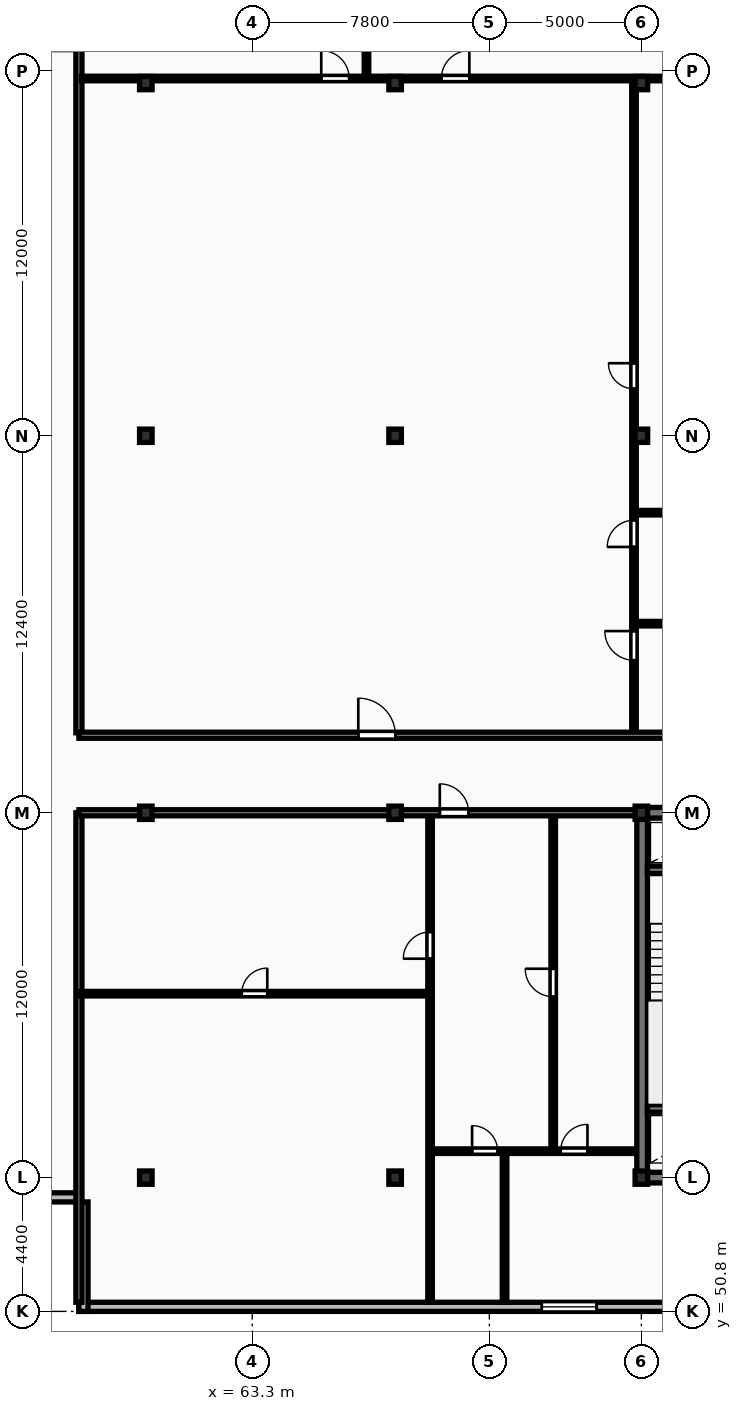
"""IFC4 building model, lengths in metres.
Left out: names, types, materials, properties, quantities, classifications, styles, units other than length and angle.
Written with IfcOpenShell. Run it as: python <this file> out.ifc"""

import sys

from ifc_helpers import new_model, si_unit, direction, frame, frame_2d, origin, origin_2d, place, context, subcontext, project, spatial, rectangle, i_section, extrude, element, fill, save


model = new_model("IFC4")
c1 = context("Model", 3, precision=1e-05, world=origin(), true_north=direction((0.0, 1.0)))
c2 = subcontext(c1, "Body", "Model", "MODEL_VIEW")
j1 = project(units=[si_unit("LENGTHUNIT", "METRE"), si_unit("PLANEANGLEUNIT", "RADIAN")], contexts=[c1])
p1 = place(None, origin())
s1 = spatial("IfcSite", under=j1, at=p1, CompositionType="ELEMENT")
p2 = place(p1, origin())
s2 = spatial("IfcBuilding", under=s1, at=p2, CompositionType="ELEMENT")
p3 = place(p2, frame((0.0, 0.0, 150.1)))
s3 = spatial("IfcBuildingStorey", under=s2, at=p3, CompositionType="ELEMENT", Elevation=150.1)
for number, where, z_axis, x_axis in (
    (1, (59.8, 55.2, 0.0), (0.0, 0.0, 1.0), (1.0, 0.0, 0.0)),
    (2, (59.8, 67.2, 0.0), (0.0, 0.0, 1.0), (1.0, 0.0, 0.0)),
    (3, (59.8, 79.6, 0.0), (0.0, 0.0, 1.0), (1.0, 0.0, 0.0)),
    (4, (59.8, 91.2, 0.0), (0.0, 0.0, 1.0), (1.0, 0.0, 0.0)),
    (5, (68.0, 55.2, 0.0), (0.0, 0.0, 1.0), (1.0, 0.0, 0.0)),
    (6, (68.0, 67.2, 0.0), (0.0, 0.0, 1.0), (1.0, 0.0, 0.0)),
    (7, (68.0, 79.6, 0.0), (0.0, 0.0, 1.0), (1.0, 0.0, 0.0)),
    (8, (68.0, 91.2, 0.0), (0.0, 0.0, 1.0), (1.0, 0.0, 0.0)),
    (9, (76.1, 55.2, 0.0), (0.0, 0.0, 1.0), (1.0, 0.0, 0.0)),
    (10, (76.1, 67.2, 0.0), (0.0, 0.0, 1.0), (1.0, 0.0, 0.0)),
    (11, (76.1, 79.6, 0.0), (0.0, 0.0, 1.0), (1.0, 0.0, 0.0)),
    (12, (76.1, 91.2, 0.0), (0.0, 0.0, 1.0), (1.0, 0.0, 0.0)),
):
    element("IfcColumn", number, at=place(p3, frame(where, z_axis=z_axis, x_axis=x_axis)), inside=s3, PredefinedType="COLUMN", context=c2, shape_type="SweptSolid", body=[
        extrude(i_section(OverallWidth=0.412, OverallDepth=0.437, WebThickness=0.036, FlangeThickness=0.052, FilletRadius=0.015, at=origin_2d()), origin(), (0.0, 0.0, 1.0), 3.6),
    ])
p4 = place(p3, frame((57.6, 50.95, 0.0), z_axis=(0.0, 0.0, 1.0), x_axis=(1.0, 0.0, 0.0)))
e13 = element("IfcWall", 13, at=p4, inside=s3, PredefinedType="STANDARD", context=c2, shape_type="SweptSolid", body=[
    extrude(rectangle(XDim=73.0, YDim=0.3, at=frame_2d((36.5, 0.0))), origin(), (0.0, 0.0, 1.0), 3.31),
])
p5 = place(p4, frame((15.225, 0.0, 0.85)))
e14 = element("IfcOpeningElement", 14, at=p5, cuts=e13, PredefinedType="OPENING", context=c2, shape_type="SweptSolid", body=[
    extrude(rectangle(XDim=1.8, YDim=1.8, at=frame_2d((0.9, 0.9))), frame((0.0, 0.16, 0.0), z_axis=(0.0, -1.0, 0.0), x_axis=(1.0, 0.0, 0.0)), (0.0, 0.0, 1.0), 0.32),
])
p6 = place(p4, frame((58.575, 0.0, 0.85)))
e15 = element("IfcOpeningElement", 15, at=p6, cuts=e13, PredefinedType="OPENING", context=c2, shape_type="SweptSolid", body=[
    extrude(rectangle(XDim=1.8, YDim=1.8, at=frame_2d((0.9, 0.9))), frame((0.0, 0.16, 0.0), z_axis=(0.0, -1.0, 0.0), x_axis=(1.0, 0.0, 0.0)), (0.0, 0.0, 1.0), 0.32),
])
p7 = place(p4, frame((33.45, 0.0, 0.0)))
e16 = element("IfcOpeningElement", 16, at=p7, cuts=e13, PredefinedType="OPENING", context=c2, shape_type="SweptSolid", body=[
    extrude(rectangle(XDim=1.1, YDim=2.1, at=frame_2d((0.55, 1.05))), frame((0.0, 0.16, 0.0), z_axis=(0.0, -1.0, 0.0), x_axis=(1.0, 0.0, 0.0)), (0.0, 0.0, 1.0), 0.32),
])
p8 = place(p3, frame((54.0, 54.55, 0.0), z_axis=(0.0, 0.0, 1.0), x_axis=(1.0, 0.0, 0.0)))
e17 = element("IfcWall", 17, at=p8, inside=s3, PredefinedType="STANDARD", context=c2, shape_type="SweptSolid", body=[
    extrude(rectangle(XDim=3.6, YDim=0.3, at=frame_2d((1.8, 0.0))), origin(), (0.0, 0.0, 1.0), 3.31),
])
p9 = place(p3, frame((57.75, 54.4, 0.0), z_axis=(0.0, 0.0, 1.0), x_axis=(0.0, -1.0, 0.0)))
e18 = element("IfcWall", 18, at=p9, inside=s3, PredefinedType="STANDARD", context=c2, shape_type="SweptSolid", body=[
    extrude(rectangle(XDim=3.6, YDim=0.3, at=frame_2d((1.8, 0.0))), origin(), (0.0, 0.0, 1.0), 3.31),
])
p10 = place(p3, frame((75.95, 55.2, 0.0), z_axis=(0.0, 0.0, 1.0), x_axis=(1.0, 0.0, 0.0)))
e19 = element("IfcWall", 19, at=p10, inside=s3, PredefinedType="SHEAR", context=c2, shape_type="SweptSolid", body=[
    extrude(rectangle(XDim=36.3, YDim=0.35, at=frame_2d((18.15, 0.0))), origin(), (0.0, 0.0, 1.0), 3.6),
])
p11 = place(p10, frame((15.1, 0.0, 0.0)))
e20 = element("IfcOpeningElement", 20, at=p11, cuts=e19, PredefinedType="OPENING", context=c2, shape_type="SweptSolid", body=[
    extrude(rectangle(XDim=1.1, YDim=2.1, at=frame_2d((0.55, 1.05))), frame((0.0, 0.185, 0.0), z_axis=(0.0, -1.0, 0.0), x_axis=(1.0, 0.0, 0.0)), (0.0, 0.0, 1.0), 0.37),
])
p12 = place(p3, frame((76.125, 55.375, 0.0), z_axis=(0.0, 0.0, 1.0), x_axis=(0.0, 1.0, 0.0)))
e21 = element("IfcWall", 21, at=p12, inside=s3, PredefinedType="SHEAR", context=c2, shape_type="SweptSolid", body=[
    extrude(rectangle(XDim=11.65, YDim=0.35, at=frame_2d((5.825, 0.0))), origin(), (0.0, 0.0, 1.0), 3.6),
])
p13 = place(p3, frame((75.95, 67.2, 0.0), z_axis=(0.0, 0.0, 1.0), x_axis=(1.0, 0.0, 0.0)))
e22 = element("IfcWall", 22, at=p13, inside=s3, PredefinedType="SHEAR", context=c2, shape_type="SweptSolid", body=[
    extrude(rectangle(XDim=36.3, YDim=0.35, at=frame_2d((18.15, 0.0))), origin(), (0.0, 0.0, 1.0), 3.6),
])
p14 = place(p13, frame((5.25, 0.0, 0.0)))
e23 = element("IfcOpeningElement", 23, at=p14, cuts=e22, PredefinedType="OPENING", context=c2, shape_type="SweptSolid", body=[
    extrude(rectangle(XDim=1.0, YDim=2.15, at=frame_2d((0.5, 1.075))), frame((0.0, 0.185, 0.0), z_axis=(0.0, -1.0, 0.0), x_axis=(1.0, 0.0, 0.0)), (0.0, 0.0, 1.0), 0.37),
])
p15 = place(p13, frame((21.6, 0.0, 0.0)))
e24 = element("IfcOpeningElement", 24, at=p15, cuts=e22, PredefinedType="OPENING", context=c2, shape_type="SweptSolid", body=[
    extrude(rectangle(XDim=1.5, YDim=2.2, at=frame_2d((0.75, 1.1))), frame((0.0, 0.185, 0.0), z_axis=(0.0, -1.0, 0.0), x_axis=(1.0, 0.0, 0.0)), (0.0, 0.0, 1.0), 0.37),
])
p16 = place(p13, frame((30.45, 0.0, 0.0)))
e25 = element("IfcOpeningElement", 25, at=p16, cuts=e22, PredefinedType="OPENING", context=c2, shape_type="SweptSolid", body=[
    extrude(rectangle(XDim=1.0, YDim=2.15, at=frame_2d((0.5, 1.075))), frame((0.0, 0.185, 0.0), z_axis=(0.0, -1.0, 0.0), x_axis=(1.0, 0.0, 0.0)), (0.0, 0.0, 1.0), 0.37),
])
for number, where, z_axis, x_axis in (
    (26, (76.3, 57.475, 0.0), (0.0, 0.0, 1.0), (1.0, 0.0, 0.0)),
    (27, (76.3, 65.325, 0.0), (0.0, 0.0, 1.0), (1.0, 0.0, 0.0)),
):
    element("IfcWall", number, at=place(p3, frame(where, z_axis=z_axis, x_axis=x_axis)), inside=s3, PredefinedType="SHEAR", context=c2, shape_type="SweptSolid", body=[
        extrude(rectangle(XDim=3.24, YDim=0.25, at=frame_2d((1.62, 0.0))), origin(), (0.0, 0.0, 1.0), 3.6),
    ])
p17 = place(p3, frame((57.6, 51.1, 0.0), z_axis=(0.0, 0.0, 1.0), x_axis=(0.0, 1.0, 0.0)))
e28 = element("IfcWall", 28, at=p17, inside=s3, PredefinedType="PARTITIONING", context=c2, shape_type="SweptSolid", body=[
    extrude(rectangle(XDim=16.1, YDim=0.2, at=frame_2d((8.05, 0.0))), origin(), (0.0, 0.0, 1.0), 3.31),
])
p18 = place(p3, frame((57.6, 61.25, 0.0), z_axis=(0.0, 0.0, 1.0), x_axis=(1.0, 0.0, 0.0)))
e29 = element("IfcWall", 29, at=p18, inside=s3, PredefinedType="PARTITIONING", context=c2, shape_type="SweptSolid", body=[
    extrude(rectangle(XDim=11.55, YDim=0.15, at=frame_2d((5.775, 0.0))), origin(), (0.0, 0.0, 1.0), 3.31),
])
p19 = place(p18, frame((5.355, 0.0, 0.0)))
e30 = element("IfcOpeningElement", 30, at=p19, cuts=e29, PredefinedType="OPENING", context=c2, shape_type="SweptSolid", body=[
    extrude(rectangle(XDim=0.84, YDim=2.04, at=frame_2d((0.42, 1.02))), frame((0.0, 0.085, 0.0), z_axis=(0.0, -1.0, 0.0), x_axis=(1.0, 0.0, 0.0)), (0.0, 0.0, 1.0), 0.17),
])
p20 = place(p3, frame((69.15, 51.1, 0.0), z_axis=(0.0, 0.0, 1.0), x_axis=(0.0, 1.0, 0.0)))
e31 = element("IfcWall", 31, at=p20, inside=s3, PredefinedType="PARTITIONING", context=c2, shape_type="SweptSolid", body=[
    extrude(rectangle(XDim=16.05, YDim=0.15, at=frame_2d((8.025, 0.0))), origin(), (0.0, 0.0, 1.0), 3.31),
])
p21 = place(p20, frame((11.3, 0.0, 0.0)))
e32 = element("IfcOpeningElement", 32, at=p21, cuts=e31, PredefinedType="OPENING", context=c2, shape_type="SweptSolid", body=[
    extrude(rectangle(XDim=0.88, YDim=2.06, at=frame_2d((0.44, 1.03))), frame((0.0, 0.085, 0.0), z_axis=(0.0, -1.0, 0.0), x_axis=(1.0, 0.0, 0.0)), (0.0, 0.0, 1.0), 0.17),
])
p22 = place(p3, frame((73.2, 56.07, 0.0), z_axis=(0.0, 0.0, 1.0), x_axis=(0.0, 1.0, 0.0)))
e33 = element("IfcWall", 33, at=p22, inside=s3, PredefinedType="PARTITIONING", context=c2, shape_type="SweptSolid", body=[
    extrude(rectangle(XDim=11.08, YDim=0.15, at=frame_2d((5.54, 0.0))), origin(), (0.0, 0.0, 1.0), 3.31),
])
p23 = place(p22, frame((5.08, 0.0, 0.0)))
e34 = element("IfcOpeningElement", 34, at=p23, cuts=e33, PredefinedType="OPENING", context=c2, shape_type="SweptSolid", body=[
    extrude(rectangle(XDim=0.92, YDim=2.08, at=frame_2d((0.46, 1.04))), frame((0.0, 0.085, 0.0), z_axis=(0.0, -1.0, 0.0), x_axis=(1.0, 0.0, 0.0)), (0.0, 0.0, 1.0), 0.17),
])
p24 = place(p3, frame((71.6, 51.1, 0.0), z_axis=(0.0, 0.0, 1.0), x_axis=(0.0, 1.0, 0.0)))
e35 = element("IfcWall", 35, at=p24, inside=s3, PredefinedType="PARTITIONING", context=c2, shape_type="SweptSolid", body=[
    extrude(rectangle(XDim=4.97, YDim=0.15, at=frame_2d((2.485, 0.0))), origin(), (0.0, 0.0, 1.0), 3.31),
])
p25 = place(p3, frame((69.17, 56.07, 0.0), z_axis=(0.0, 0.0, 1.0), x_axis=(1.0, 0.0, 0.0)))
e36 = element("IfcWall", 36, at=p25, inside=s3, PredefinedType="PARTITIONING", context=c2, shape_type="SweptSolid", body=[
    extrude(rectangle(XDim=6.76, YDim=0.15, at=frame_2d((3.38, 0.0))), origin(), (0.0, 0.0, 1.0), 3.31),
])
p26 = place(p25, frame((1.362, 0.0, 0.0)))
e37 = element("IfcOpeningElement", 37, at=p26, cuts=e36, PredefinedType="OPENING", context=c2, shape_type="SweptSolid", body=[
    extrude(rectangle(XDim=0.84, YDim=2.04, at=frame_2d((0.42, 1.02))), frame((0.0, 0.085, 0.0), z_axis=(0.0, -1.0, 0.0), x_axis=(1.0, 0.0, 0.0)), (0.0, 0.0, 1.0), 0.17),
])
p27 = place(p25, frame((4.277, 0.0, 0.0)))
e38 = element("IfcOpeningElement", 38, at=p27, cuts=e36, PredefinedType="OPENING", context=c2, shape_type="SweptSolid", body=[
    extrude(rectangle(XDim=0.88, YDim=2.06, at=frame_2d((0.44, 1.03))), frame((0.0, 0.085, 0.0), z_axis=(0.0, -1.0, 0.0), x_axis=(1.0, 0.0, 0.0)), (0.0, 0.0, 1.0), 0.17),
])
p28 = place(p3, frame((57.6, 67.2, 0.0), z_axis=(0.0, 0.0, 1.0), x_axis=(1.0, 0.0, 0.0)))
e39 = element("IfcWall", 39, at=p28, inside=s3, PredefinedType="PARTITIONING", context=c2, shape_type="SweptSolid", body=[
    extrude(rectangle(XDim=18.35, YDim=0.2, at=frame_2d((9.175, 0.0))), origin(), (0.0, 0.0, 1.0), 2.773),
])
p29 = place(p28, frame((11.87, 0.0, 0.0)))
e40 = element("IfcOpeningElement", 40, at=p29, cuts=e39, PredefinedType="OPENING", context=c2, shape_type="SweptSolid", body=[
    extrude(rectangle(XDim=0.95, YDim=2.15, at=frame_2d((0.475, 1.075))), frame((0.0, 0.11, 0.0), z_axis=(0.0, -1.0, 0.0), x_axis=(1.0, 0.0, 0.0)), (0.0, 0.0, 1.0), 0.22),
])
p30 = place(p3, frame((57.6, 69.83, 0.0), z_axis=(0.0, 0.0, 1.0), x_axis=(0.0, 1.0, 0.0)))
e41 = element("IfcWall", 41, at=p30, inside=s3, PredefinedType="PARTITIONING", context=c2, shape_type="SweptSolid", body=[
    extrude(rectangle(XDim=26.07, YDim=0.2, at=frame_2d((13.035, 0.0))), origin(), (0.0, 0.0, 1.0), 3.31),
])
for number, where, z_axis, x_axis in (
    (42, (75.917, 73.42, 0.0), (0.0, 0.0, 1.0), (1.0, 0.0, 0.0)),
    (43, (75.917, 77.07, 0.0), (0.0, 0.0, 1.0), (1.0, 0.0, 0.0)),
):
    element("IfcWall", number, at=place(p3, frame(where, z_axis=z_axis, x_axis=x_axis)), inside=s3, PredefinedType="PARTITIONING", context=c2, shape_type="SweptSolid", body=[
        extrude(rectangle(XDim=3.36, YDim=0.15, at=frame_2d((1.68, 0.0))), origin(), (0.0, 0.0, 1.0), 3.31),
    ])
p31 = place(p3, frame((75.857, 69.81, 0.0), z_axis=(0.0, 0.0, 1.0), x_axis=(0.0, 1.0, 0.0)))
e44 = element("IfcWall", 44, at=p31, inside=s3, PredefinedType="PARTITIONING", context=c2, shape_type="SweptSolid", body=[
    extrude(rectangle(XDim=21.48, YDim=0.15, at=frame_2d((10.74, 0.0))), origin(), (0.0, 0.0, 1.0), 2.617),
])
p32 = place(p31, frame((2.406, 0.0, 0.0)))
e45 = element("IfcOpeningElement", 45, at=p32, cuts=e44, PredefinedType="OPENING", context=c2, shape_type="SweptSolid", body=[
    extrude(rectangle(XDim=0.96, YDim=2.1, at=frame_2d((0.48, 1.05))), frame((0.0, 0.085, 0.0), z_axis=(0.0, -1.0, 0.0), x_axis=(1.0, 0.0, 0.0)), (0.0, 0.0, 1.0), 0.17),
])
p33 = place(p31, frame((6.133, 0.0, 0.0)))
e46 = element("IfcOpeningElement", 46, at=p33, cuts=e44, PredefinedType="OPENING", context=c2, shape_type="SweptSolid", body=[
    extrude(rectangle(XDim=0.88, YDim=2.06, at=frame_2d((0.44, 1.03))), frame((0.0, 0.085, 0.0), z_axis=(0.0, -1.0, 0.0), x_axis=(1.0, 0.0, 0.0)), (0.0, 0.0, 1.0), 0.17),
])
p34 = place(p31, frame((11.336, 0.0, 0.0)))
e47 = element("IfcOpeningElement", 47, at=p34, cuts=e44, PredefinedType="OPENING", context=c2, shape_type="SweptSolid", body=[
    extrude(rectangle(XDim=0.84, YDim=2.04, at=frame_2d((0.42, 1.02))), frame((0.0, 0.085, 0.0), z_axis=(0.0, -1.0, 0.0), x_axis=(1.0, 0.0, 0.0)), (0.0, 0.0, 1.0), 0.17),
])
p35 = place(p3, frame((67.059, 91.43, 0.0), z_axis=(0.0, 0.0, 1.0), x_axis=(0.0, 1.0, 0.0)))
e48 = element("IfcWall", 48, at=p35, inside=s3, PredefinedType="PARTITIONING", context=c2, shape_type="SweptSolid", body=[
    extrude(rectangle(XDim=4.47, YDim=0.15, at=frame_2d((2.235, 0.0))), origin(), (0.0, 0.0, 1.0), 3.31),
])
p36 = place(p3, frame((57.68, 91.35, 0.0), z_axis=(0.0, 0.0, 1.0), x_axis=(1.0, 0.0, 0.0)))
e49 = element("IfcWall", 49, at=p36, inside=s3, PredefinedType="PARTITIONING", context=c2, shape_type="SweptSolid", body=[
    extrude(rectangle(XDim=21.597, YDim=0.15, at=frame_2d((10.799, 0.0))), origin(), (0.0, 0.0, 1.0), 3.003),
])
p37 = place(p36, frame((7.89, 0.0, 0.0)))
e50 = element("IfcOpeningElement", 50, at=p37, cuts=e49, PredefinedType="OPENING", context=c2, shape_type="SweptSolid", body=[
    extrude(rectangle(XDim=0.92, YDim=2.08, at=frame_2d((0.46, 1.04))), frame((0.0, 0.085, 0.0), z_axis=(0.0, -1.0, 0.0), x_axis=(1.0, 0.0, 0.0)), (0.0, 0.0, 1.0), 0.17),
])
p38 = place(p36, frame((11.842, 0.0, 0.0)))
e51 = element("IfcOpeningElement", 51, at=p38, cuts=e49, PredefinedType="OPENING", context=c2, shape_type="SweptSolid", body=[
    extrude(rectangle(XDim=0.92, YDim=2.08, at=frame_2d((0.46, 1.04))), frame((0.0, 0.085, 0.0), z_axis=(0.0, -1.0, 0.0), x_axis=(1.0, 0.0, 0.0)), (0.0, 0.0, 1.0), 0.17),
])
p39 = place(p3, frame((57.6, 69.75, 0.0), z_axis=(0.0, 0.0, 1.0), x_axis=(1.0, 0.0, 0.0)))
e52 = element("IfcWall", 52, at=p39, inside=s3, PredefinedType="PARTITIONING", context=c2, shape_type="SweptSolid", body=[
    extrude(rectangle(XDim=73.0, YDim=0.2, at=frame_2d((36.5, 0.0))), origin(), (0.0, 0.0, 1.0), 3.31),
])
p40 = place(p39, frame((9.189, 0.0, 0.0)))
e53 = element("IfcOpeningElement", 53, at=p40, cuts=e52, PredefinedType="OPENING", context=c2, shape_type="SweptSolid", body=[
    extrude(rectangle(XDim=1.22, YDim=2.18, at=frame_2d((0.61, 1.09))), frame((0.0, 0.11, 0.0), z_axis=(0.0, -1.0, 0.0), x_axis=(1.0, 0.0, 0.0)), (0.0, 0.0, 1.0), 0.22),
])
p41 = place(p39, frame((29.912, 0.0, 0.0)))
e54 = element("IfcOpeningElement", 54, at=p41, cuts=e52, PredefinedType="OPENING", context=c2, shape_type="SweptSolid", body=[
    extrude(rectangle(XDim=1.22, YDim=2.18, at=frame_2d((0.61, 1.09))), frame((0.0, 0.11, 0.0), z_axis=(0.0, -1.0, 0.0), x_axis=(1.0, 0.0, 0.0)), (0.0, 0.0, 1.0), 0.22),
])
p42 = place(p39, frame((49.457, 0.0, 0.0)))
e55 = element("IfcOpeningElement", 55, at=p42, cuts=e52, PredefinedType="OPENING", context=c2, shape_type="SweptSolid", body=[
    extrude(rectangle(XDim=1.22, YDim=2.18, at=frame_2d((0.61, 1.09))), frame((0.0, 0.11, 0.0), z_axis=(0.0, -1.0, 0.0), x_axis=(1.0, 0.0, 0.0)), (0.0, 0.0, 1.0), 0.22),
])
p43 = place(p39, frame((63.122, 0.0, 0.0)))
e56 = element("IfcOpeningElement", 56, at=p43, cuts=e52, PredefinedType="OPENING", context=c2, shape_type="SweptSolid", body=[
    extrude(rectangle(XDim=0.95, YDim=2.15, at=frame_2d((0.475, 1.075))), frame((0.0, 0.11, 0.0), z_axis=(0.0, -1.0, 0.0), x_axis=(1.0, 0.0, 0.0)), (0.0, 0.0, 1.0), 0.22),
])
p44 = place(p5, origin())
e57 = element("IfcWindow", 57, at=p44, inside=s3, PartitioningType="SINGLE_PANEL", PredefinedType="WINDOW", context=c2, shape_type="SweptSolid", body=[
    extrude(rectangle(XDim=1.8, YDim=1.8, at=frame_2d((0.9, 0.9))), frame((0.0, 0.03, 0.0), z_axis=(0.0, -1.0, 0.0), x_axis=(1.0, 0.0, 0.0)), (0.0, 0.0, 1.0), 0.06),
])
fill(e14, e57)
p45 = place(p19, origin())
e58 = element("IfcDoor", 58, at=p45, inside=s3, OperationType="SINGLE_SWING_RIGHT", PredefinedType="DOOR", context=c2, shape_type="SweptSolid", body=[
    extrude(rectangle(XDim=0.84, YDim=2.04, at=frame_2d((0.42, 1.02))), frame((0.0, 0.025, 0.0), z_axis=(0.0, -1.0, 0.0), x_axis=(1.0, 0.0, 0.0)), (0.0, 0.0, 1.0), 0.05),
])
fill(e30, e58)
p46 = place(p21, origin())
e59 = element("IfcDoor", 59, at=p46, inside=s3, OperationType="SINGLE_SWING_LEFT", PredefinedType="DOOR", context=c2, shape_type="SweptSolid", body=[
    extrude(rectangle(XDim=0.88, YDim=2.06, at=frame_2d((0.44, 1.03))), frame((0.0, 0.025, 0.0), z_axis=(0.0, -1.0, 0.0), x_axis=(1.0, 0.0, 0.0)), (0.0, 0.0, 1.0), 0.05),
])
fill(e32, e59)
p47 = place(p23, origin())
e60 = element("IfcDoor", 60, at=p47, inside=s3, OperationType="SINGLE_SWING_RIGHT", PredefinedType="DOOR", context=c2, shape_type="SweptSolid", body=[
    extrude(rectangle(XDim=0.92, YDim=2.08, at=frame_2d((0.46, 1.04))), frame((0.0, 0.025, 0.0), z_axis=(0.0, -1.0, 0.0), x_axis=(1.0, 0.0, 0.0)), (0.0, 0.0, 1.0), 0.05),
])
fill(e34, e60)
p48 = place(p26, origin())
e61 = element("IfcDoor", 61, at=p48, inside=s3, OperationType="SINGLE_SWING_LEFT", PredefinedType="DOOR", context=c2, shape_type="SweptSolid", body=[
    extrude(rectangle(XDim=0.84, YDim=2.04, at=frame_2d((0.42, 1.02))), frame((0.0, 0.025, 0.0), z_axis=(0.0, -1.0, 0.0), x_axis=(1.0, 0.0, 0.0)), (0.0, 0.0, 1.0), 0.05),
])
fill(e37, e61)
p49 = place(p27, origin())
e62 = element("IfcDoor", 62, at=p49, inside=s3, OperationType="SINGLE_SWING_RIGHT", PredefinedType="DOOR", context=c2, shape_type="SweptSolid", body=[
    extrude(rectangle(XDim=0.88, YDim=2.06, at=frame_2d((0.44, 1.03))), frame((0.0, 0.025, 0.0), z_axis=(0.0, -1.0, 0.0), x_axis=(1.0, 0.0, 0.0)), (0.0, 0.0, 1.0), 0.05),
])
fill(e38, e62)
p50 = place(p29, origin())
e63 = element("IfcDoor", 63, at=p50, inside=s3, OperationType="SINGLE_SWING_LEFT", PredefinedType="DOOR", context=c2, shape_type="SweptSolid", body=[
    extrude(rectangle(XDim=0.95, YDim=2.15, at=frame_2d((0.475, 1.075))), frame((0.0, 0.025, 0.0), z_axis=(0.0, -1.0, 0.0), x_axis=(1.0, 0.0, 0.0)), (0.0, 0.0, 1.0), 0.05),
])
fill(e40, e63)
p51 = place(p32, origin())
e64 = element("IfcDoor", 64, at=p51, inside=s3, OperationType="SINGLE_SWING_RIGHT", PredefinedType="DOOR", context=c2, shape_type="SweptSolid", body=[
    extrude(rectangle(XDim=0.96, YDim=2.1, at=frame_2d((0.48, 1.05))), frame((0.0, 0.025, 0.0), z_axis=(0.0, -1.0, 0.0), x_axis=(1.0, 0.0, 0.0)), (0.0, 0.0, 1.0), 0.05),
])
fill(e45, e64)
p52 = place(p33, origin())
e65 = element("IfcDoor", 65, at=p52, inside=s3, OperationType="SINGLE_SWING_LEFT", PredefinedType="DOOR", context=c2, shape_type="SweptSolid", body=[
    extrude(rectangle(XDim=0.88, YDim=2.06, at=frame_2d((0.44, 1.03))), frame((0.0, 0.025, 0.0), z_axis=(0.0, -1.0, 0.0), x_axis=(1.0, 0.0, 0.0)), (0.0, 0.0, 1.0), 0.05),
])
fill(e46, e65)
p53 = place(p34, origin())
e66 = element("IfcDoor", 66, at=p53, inside=s3, OperationType="SINGLE_SWING_RIGHT", PredefinedType="DOOR", context=c2, shape_type="SweptSolid", body=[
    extrude(rectangle(XDim=0.84, YDim=2.04, at=frame_2d((0.42, 1.02))), frame((0.0, 0.025, 0.0), z_axis=(0.0, -1.0, 0.0), x_axis=(1.0, 0.0, 0.0)), (0.0, 0.0, 1.0), 0.05),
])
fill(e47, e66)
p54 = place(p37, origin())
e67 = element("IfcDoor", 67, at=p54, inside=s3, OperationType="SINGLE_SWING_LEFT", PredefinedType="DOOR", context=c2, shape_type="SweptSolid", body=[
    extrude(rectangle(XDim=0.92, YDim=2.08, at=frame_2d((0.46, 1.04))), frame((0.0, 0.025, 0.0), z_axis=(0.0, -1.0, 0.0), x_axis=(1.0, 0.0, 0.0)), (0.0, 0.0, 1.0), 0.05),
])
fill(e50, e67)
p55 = place(p38, origin())
e68 = element("IfcDoor", 68, at=p55, inside=s3, OperationType="SINGLE_SWING_RIGHT", PredefinedType="DOOR", context=c2, shape_type="SweptSolid", body=[
    extrude(rectangle(XDim=0.92, YDim=2.08, at=frame_2d((0.46, 1.04))), frame((0.0, 0.025, 0.0), z_axis=(0.0, -1.0, 0.0), x_axis=(1.0, 0.0, 0.0)), (0.0, 0.0, 1.0), 0.05),
])
fill(e51, e68)
p56 = place(p40, origin())
e69 = element("IfcDoor", 69, at=p56, inside=s3, OperationType="SINGLE_SWING_LEFT", PredefinedType="DOOR", context=c2, shape_type="SweptSolid", body=[
    extrude(rectangle(XDim=1.22, YDim=2.18, at=frame_2d((0.61, 1.09))), frame((0.0, 0.025, 0.0), z_axis=(0.0, -1.0, 0.0), x_axis=(1.0, 0.0, 0.0)), (0.0, 0.0, 1.0), 0.05),
])
fill(e53, e69)
save(model, sys.argv[1])
